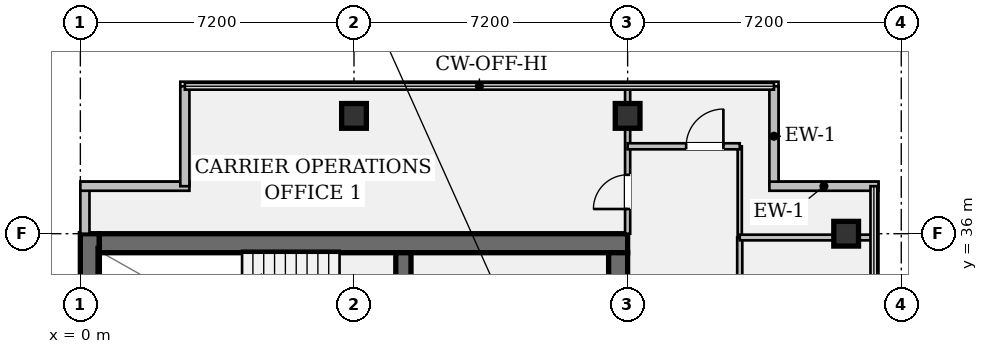
"""IFC4 building model, lengths in metres.
Left out: names, types, materials, properties, quantities, classifications, styles, units other than length and angle.
Written with IfcOpenShell. Run it as: python <this file> out.ifc"""

import sys

from ifc_helpers import new_model, si_unit, direction, frame, frame_2d, origin, origin_2d, place, context, subcontext, project, spatial, rectangle, hollow_rectangle, extrude, element, fill, save


model = new_model("IFC4")
c1 = context("Model", 3, precision=1e-05, world=origin(), true_north=direction((0.0, 1.0)))
c2 = subcontext(c1, "Body", "Model", "MODEL_VIEW")
j1 = project(units=[si_unit("LENGTHUNIT", "METRE"), si_unit("PLANEANGLEUNIT", "RADIAN")], contexts=[c1])
p1 = place(None, origin())
s1 = spatial("IfcSite", under=j1, at=p1, CompositionType="ELEMENT")
p2 = place(p1, origin())
s2 = spatial("IfcBuilding", under=s1, at=p2, CompositionType="ELEMENT")
p3 = place(p2, frame((0.0, 0.0, 276.15)))
s3 = spatial("IfcBuildingStorey", under=s2, at=p3, CompositionType="ELEMENT", Elevation=276.15)
p4 = place(p3, frame((0.25, 7.2, 0.0), z_axis=(0.0, 0.0, 1.0), x_axis=(0.0, 1.0, 0.0)))
e1 = element("IfcWall", 1, at=p4, inside=s3, PredefinedType="SHEAR", context=c2, shape_type="SweptSolid", body=[
    extrude(rectangle(XDim=28.8, YDim=0.5, at=frame_2d((14.4, 0.0))), origin(), (0.0, 0.0, 1.0), 3.24),
])
p5 = place(p3, frame((0.5, 35.75, 0.0), z_axis=(0.0, 0.0, 1.0), x_axis=(1.0, 0.0, 0.0)))
e2 = element("IfcWall", 2, at=p5, inside=s3, PredefinedType="SHEAR", context=c2, shape_type="SweptSolid", body=[
    extrude(rectangle(XDim=13.9, YDim=0.5, at=frame_2d((6.95, 0.0))), origin(), (0.0, 0.0, 1.0), 3.24),
])
p6 = place(p3, frame((14.15, 35.5, 0.0), z_axis=(0.0, 0.0, 1.0), x_axis=(0.0, -1.0, 0.0)))
e3 = element("IfcWall", 3, at=p6, inside=s3, PredefinedType="SHEAR", context=c2, shape_type="SweptSolid", body=[
    extrude(rectangle(XDim=27.8, YDim=0.5, at=frame_2d((13.9, 0.0))), origin(), (0.0, 0.0, 1.0), 3.24),
])
p7 = place(p6, frame((1.4, 0.0, 0.0)))
e4 = element("IfcOpeningElement", 4, at=p7, cuts=e3, PredefinedType="OPENING", context=c2, shape_type="SweptSolid", body=[
    extrude(rectangle(XDim=1.2, YDim=2.15, at=frame_2d((0.6, 1.075))), frame((0.0, 0.262, 0.0), z_axis=(0.0, -1.0, 0.0), x_axis=(1.0, 0.0, 0.0)), (0.0, 0.0, 1.0), 0.524),
])
p8 = place(p6, frame((25.35, 0.0, 0.0)))
e5 = element("IfcOpeningElement", 5, at=p8, cuts=e3, PredefinedType="OPENING", context=c2, shape_type="SweptSolid", body=[
    extrude(rectangle(XDim=1.2, YDim=2.15, at=frame_2d((0.6, 1.075))), frame((0.0, 0.262, 0.0), z_axis=(0.0, -1.0, 0.0), x_axis=(1.0, 0.0, 0.0)), (0.0, 0.0, 1.0), 0.524),
])
p9 = place(p6, frame((14.7, 0.0, 0.0)))
e6 = element("IfcOpeningElement", 6, at=p9, cuts=e3, PredefinedType="OPENING", context=c2, shape_type="SweptSolid", body=[
    extrude(rectangle(XDim=1.6, YDim=2.2, at=frame_2d((0.8, 1.1))), frame((0.0, 0.262, 0.0), z_axis=(0.0, -1.0, 0.0), x_axis=(1.0, 0.0, 0.0)), (0.0, 0.0, 1.0), 0.524),
])
p10 = place(p3, frame((8.5, 31.72, 0.0), z_axis=(0.0, 0.0, 1.0), x_axis=(0.0, 1.0, 0.0)))
e7 = element("IfcWall", 7, at=p10, inside=s3, PredefinedType="SHEAR", context=c2, shape_type="SweptSolid", body=[
    extrude(rectangle(XDim=3.78, YDim=0.4, at=frame_2d((1.89, 0.0))), origin(), (0.0, 0.0, 1.0), 3.24),
])
p11 = place(p10, frame((0.9, 0.0, 0.0)))
e8 = element("IfcOpeningElement", 8, at=p11, cuts=e7, PredefinedType="OPENING", context=c2, shape_type="SweptSolid", body=[
    extrude(rectangle(XDim=1.1, YDim=2.15, at=frame_2d((0.55, 1.075))), frame((0.0, 0.212, 0.0), z_axis=(0.0, -1.0, 0.0), x_axis=(1.0, 0.0, 0.0)), (0.0, 0.0, 1.0), 0.424),
])
for number, where, z_axis, x_axis in (
    (9, (7.2, 39.1, 0.0), (0.0, 0.0, 1.0), (1.0, 0.0, 0.0)),
    (10, (14.4, 39.1, 0.0), (0.0, 0.0, 1.0), (1.0, 0.0, 0.0)),
    (11, (20.15, 36.0, 0.0), (0.0, 0.0, 1.0), (1.0, 0.0, 0.0)),
):
    element("IfcColumn", number, at=place(p3, frame(where, z_axis=z_axis, x_axis=x_axis)), inside=s3, PredefinedType="COLUMN", context=c2, shape_type="SweptSolid", body=[
        extrude(hollow_rectangle(XDim=0.65, YDim=0.65, WallThickness=0.04, at=origin_2d()), origin(), (0.0, 0.0, 1.0), 3.24),
    ])
p12 = place(p3, frame((0.12, 36.0, 0.0), z_axis=(0.0, 0.0, 1.0), x_axis=(0.0, 1.0, 0.0)))
e12 = element("IfcWall", 12, at=p12, inside=s3, PredefinedType="STANDARD", context=c2, shape_type="SweptSolid", body=[
    extrude(rectangle(XDim=1.25, YDim=0.24, at=frame_2d((0.625, 0.0))), origin(), (0.0, 0.0, 1.0), 3.24),
])
p13 = place(p3, frame((0.0, 37.25, 0.0), z_axis=(0.0, 0.0, 1.0), x_axis=(1.0, 0.0, 0.0)))
e13 = element("IfcWall", 13, at=p13, inside=s3, PredefinedType="STANDARD", context=c2, shape_type="SweptSolid", body=[
    extrude(rectangle(XDim=2.87, YDim=0.24, at=frame_2d((1.435, 0.0))), origin(), (0.0, 0.0, 1.0), 3.24),
])
for number, where, z_axis, x_axis in (
    (14, (2.75, 37.25, 0.0), (0.0, 0.0, 1.0), (0.0, 1.0, 0.0)),
    (15, (18.25, 39.88, 0.0), (0.0, 0.0, 1.0), (0.0, -1.0, 0.0)),
):
    element("IfcWall", number, at=place(p3, frame(where, z_axis=z_axis, x_axis=x_axis)), inside=s3, PredefinedType="STANDARD", context=c2, shape_type="SweptSolid", body=[
        extrude(rectangle(XDim=2.63, YDim=0.24, at=frame_2d((1.315, 0.0))), origin(), (0.0, 0.0, 1.0), 3.24),
    ])
p14 = place(p3, frame((18.13, 37.25, 0.0), z_axis=(0.0, 0.0, 1.0), x_axis=(1.0, 0.0, 0.0)))
e16 = element("IfcWall", 16, at=p14, inside=s3, PredefinedType="STANDARD", context=c2, shape_type="SweptSolid", body=[
    extrude(rectangle(XDim=2.87, YDim=0.24, at=frame_2d((1.435, 0.0))), origin(), (0.0, 0.0, 1.0), 3.24),
])
p15 = place(p3, frame((17.35, 13.15, 0.0), z_axis=(0.0, 0.0, 1.0), x_axis=(0.0, 1.0, 0.0)))
e17 = element("IfcWall", 17, at=p15, inside=s3, PredefinedType="PARTITIONING", context=c2, shape_type="SweptSolid", body=[
    extrude(rectangle(XDim=22.75, YDim=0.135, at=frame_2d((11.375, 0.0))), origin(), (0.0, 0.0, 1.0), 2.676),
])
p16 = place(p15, frame((4.3, 0.0, 0.0)))
e18 = element("IfcOpeningElement", 18, at=p16, cuts=e17, PredefinedType="OPENING", context=c2, shape_type="SweptSolid", body=[
    extrude(rectangle(XDim=0.98, YDim=2.15, at=frame_2d((0.49, 1.075))), frame((0.0, 0.08, 0.0), z_axis=(0.0, -1.0, 0.0), x_axis=(1.0, 0.0, 0.0)), (0.0, 0.0, 1.0), 0.159),
])
p17 = place(p15, frame((8.4, 0.0, 0.0)))
e19 = element("IfcOpeningElement", 19, at=p17, cuts=e17, PredefinedType="OPENING", context=c2, shape_type="SweptSolid", body=[
    extrude(rectangle(XDim=1.0, YDim=2.15, at=frame_2d((0.5, 1.075))), frame((0.0, 0.08, 0.0), z_axis=(0.0, -1.0, 0.0), x_axis=(1.0, 0.0, 0.0)), (0.0, 0.0, 1.0), 0.159),
])
p18 = place(p3, frame((14.4, 36.0, 0.0), z_axis=(0.0, 0.0, 1.0), x_axis=(0.0, 1.0, 0.0)))
e20 = element("IfcWall", 20, at=p18, inside=s3, PredefinedType="PARTITIONING", context=c2, shape_type="SweptSolid", body=[
    extrude(rectangle(XDim=3.88, YDim=0.135, at=frame_2d((1.94, 0.0))), origin(), (0.0, 0.0, 1.0), 2.676),
])
p19 = place(p18, frame((0.65, 0.0, 0.0)))
e21 = element("IfcOpeningElement", 21, at=p19, cuts=e20, PredefinedType="OPENING", context=c2, shape_type="SweptSolid", body=[
    extrude(rectangle(XDim=0.9, YDim=2.15, at=frame_2d((0.45, 1.075))), frame((0.0, 0.08, 0.0), z_axis=(0.0, -1.0, 0.0), x_axis=(1.0, 0.0, 0.0)), (0.0, 0.0, 1.0), 0.159),
])
p20 = place(p3, frame((17.35, 35.9, 0.0), z_axis=(0.0, 0.0, 1.0), x_axis=(0.0, 1.0, 0.0)))
e22 = element("IfcWall", 22, at=p20, inside=s3, PredefinedType="PARTITIONING", context=c2, shape_type="SweptSolid", body=[
    extrude(rectangle(XDim=2.4, YDim=0.11, at=frame_2d((1.2, 0.0))), origin(), (0.0, 0.0, 1.0), 2.676),
])
p21 = place(p3, frame((14.4, 38.3, 0.0), z_axis=(0.0, 0.0, 1.0), x_axis=(1.0, 0.0, 0.0)))
e23 = element("IfcWall", 23, at=p21, inside=s3, PredefinedType="PARTITIONING", context=c2, shape_type="SweptSolid", body=[
    extrude(rectangle(XDim=2.95, YDim=0.16, at=frame_2d((1.475, 0.0))), origin(), (0.0, 0.0, 1.0), 3.24),
])
p22 = place(p21, frame((1.54, 0.0, 0.0)))
e24 = element("IfcOpeningElement", 24, at=p22, cuts=e23, PredefinedType="OPENING", context=c2, shape_type="SweptSolid", body=[
    extrude(rectangle(XDim=0.98, YDim=2.15, at=frame_2d((0.49, 1.075))), frame((0.0, 0.092, 0.0), z_axis=(0.0, -1.0, 0.0), x_axis=(1.0, 0.0, 0.0)), (0.0, 0.0, 1.0), 0.184),
])
p23 = place(p3, frame((17.35, 35.9, 0.0), z_axis=(0.0, 0.0, 1.0), x_axis=(1.0, 0.0, 0.0)))
e25 = element("IfcWall", 25, at=p23, inside=s3, PredefinedType="PARTITIONING", context=c2, shape_type="SweptSolid", body=[
    extrude(rectangle(XDim=3.53, YDim=0.15, at=frame_2d((1.765, 0.0))), origin(), (0.0, 0.0, 1.0), 2.676),
])
p24 = place(p19, origin())
e26 = element("IfcDoor", 26, at=p24, inside=s3, OperationType="SINGLE_SWING_LEFT", PredefinedType="DOOR", context=c2, shape_type="SweptSolid", body=[
    extrude(rectangle(XDim=0.9, YDim=2.15, at=frame_2d((0.45, 1.075))), frame((0.0, 0.025, 0.0), z_axis=(0.0, -1.0, 0.0), x_axis=(1.0, 0.0, 0.0)), (0.0, 0.0, 1.0), 0.05),
])
fill(e21, e26)
p25 = place(p22, origin())
e27 = element("IfcDoor", 27, at=p25, inside=s3, OperationType="SINGLE_SWING_RIGHT", PredefinedType="DOOR", context=c2, shape_type="SweptSolid", body=[
    extrude(rectangle(XDim=0.98, YDim=2.15, at=frame_2d((0.49, 1.075))), frame((0.0, 0.025, 0.0), z_axis=(0.0, -1.0, 0.0), x_axis=(1.0, 0.0, 0.0)), (0.0, 0.0, 1.0), 0.05),
])
fill(e24, e27)
save(model, sys.argv[1])
